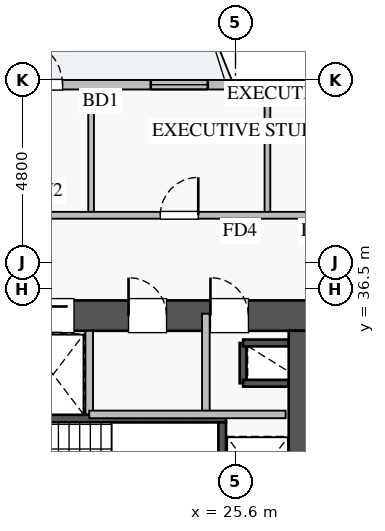
"""IFC4 building model, lengths in metres.
Left out: names, types, materials, properties, quantities, classifications, styles, units other than length and angle.
Written with IfcOpenShell. Run it as: python <this file> out.ifc"""

import sys

from ifc_helpers import new_model, si_unit, direction, frame, frame_2d, origin, place, context, subcontext, project, spatial, rectangle, extrude, source, transform, mapped, element, fill, save


model = new_model("IFC4")
c1 = context("Model", 3, precision=1e-05, world=origin(), true_north=direction((0.0, 1.0)))
c2 = subcontext(c1, "Body", "Model", "MODEL_VIEW")
j1 = project(units=[si_unit("LENGTHUNIT", "METRE"), si_unit("PLANEANGLEUNIT", "RADIAN")], contexts=[c1])
p1 = place(None, origin())
s1 = spatial("IfcSite", under=j1, at=p1, CompositionType="ELEMENT")
p2 = place(p1, origin())
s2 = spatial("IfcBuilding", under=s1, at=p2, CompositionType="ELEMENT")
p3 = place(p2, frame((0.0, 0.0, 76.25)))
s3 = spatial("IfcBuildingStorey", under=s2, at=p3, CompositionType="ELEMENT", Elevation=76.25)
p4 = place(p3, frame((25.8, 34.02, 0.0), z_axis=(0.0, 0.0, 1.0), x_axis=(0.0, 1.0, 0.0)))
e1 = element("IfcWall", 1, at=p4, inside=s3, PredefinedType="SHEAR", context=c2, shape_type="SweptSolid", body=[
    extrude(rectangle(XDim=1.06, YDim=0.18, at=frame_2d((0.53, 0.0))), origin(), (0.0, 0.0, 1.0), 3.07),
])
for number, where, z_axis, x_axis in (
    (2, (25.8, 35.08, 0.0), (0.0, 0.0, 1.0), (1.0, 0.0, 0.0)),
    (3, (25.8, 34.02, 0.0), (0.0, 0.0, 1.0), (1.0, 0.0, 0.0)),
):
    element("IfcWall", number, at=place(p3, frame(where, z_axis=z_axis, x_axis=x_axis)), inside=s3, PredefinedType="SHEAR", context=c2, shape_type="SweptSolid", body=[
        extrude(rectangle(XDim=1.2, YDim=0.18, at=frame_2d((0.6, 0.0))), origin(), (0.0, 0.0, 1.0), 3.07),
    ])
p5 = place(p3, frame((19.88, 33.2, 0.0), z_axis=(0.0, 0.0, 1.0), x_axis=(1.0, 0.0, 0.0)))
e4 = element("IfcWall", 4, at=p5, inside=s3, PredefinedType="SHEAR", context=c2, shape_type="SweptSolid", body=[
    extrude(rectangle(XDim=1.87, YDim=0.18, at=frame_2d((0.935, 0.0))), origin(), (0.0, 0.0, 1.0), 3.07),
])
p6 = place(p3, frame((18.2, 33.09, 0.0), z_axis=(0.0, 0.0, 1.0), x_axis=(1.0, 0.0, 0.0)))
e5 = element("IfcWall", 5, at=p6, inside=s3, PredefinedType="SHEAR", context=c2, shape_type="SweptSolid", body=[
    extrude(rectangle(XDim=7.15, YDim=0.2, at=frame_2d((3.575, 0.0))), origin(), (0.0, 0.0, 1.0), 3.25),
])
p7 = place(p6, frame((0.35, 0.0, 0.0)))
e6 = element("IfcOpeningElement", 6, at=p7, cuts=e5, PredefinedType="OPENING", context=c2, shape_type="SweptSolid", body=[
    extrude(rectangle(XDim=1.1, YDim=2.05, at=frame_2d((0.55, 1.025))), frame((0.0, 0.11, 0.0), z_axis=(0.0, -1.0, 0.0), x_axis=(1.0, 0.0, 0.0)), (0.0, 0.0, 1.0), 0.22),
])
p8 = place(p3, frame((25.25, 30.05, 0.0), z_axis=(0.0, 0.0, 1.0), x_axis=(0.0, 1.0, 0.0)))
e7 = element("IfcWall", 7, at=p8, inside=s3, PredefinedType="SHEAR", context=c2, shape_type="SweptSolid", body=[
    extrude(rectangle(XDim=2.94, YDim=0.2, at=frame_2d((1.47, 0.0))), origin(), (0.0, 0.0, 1.0), 3.25),
])
p9 = place(p3, frame((10.2, 35.8, 0.0), z_axis=(0.0, 0.0, 1.0), x_axis=(1.0, 0.0, 0.0)))
e8 = element("IfcWall", 8, at=p9, inside=s3, PredefinedType="SHEAR", context=c2, shape_type="SweptSolid", body=[
    extrude(rectangle(XDim=17.6, YDim=0.8, at=frame_2d((8.8, 0.0))), origin(), (0.0, 0.0, 1.0), 3.25),
])
p10 = place(p9, frame((1.15, 0.0, 0.0)))
e9 = element("IfcOpeningElement", 9, at=p10, cuts=e8, PredefinedType="OPENING", context=c2, shape_type="SweptSolid", body=[
    extrude(rectangle(XDim=1.1, YDim=2.05, at=frame_2d((0.55, 1.025))), frame((0.0, 0.41, 0.0), z_axis=(0.0, -1.0, 0.0), x_axis=(1.0, 0.0, 0.0)), (0.0, 0.0, 1.0), 0.82),
])
p11 = place(p9, frame((8.3, 0.0, 0.0)))
e10 = element("IfcOpeningElement", 10, at=p11, cuts=e8, PredefinedType="OPENING", context=c2, shape_type="SweptSolid", body=[
    extrude(rectangle(XDim=1.1, YDim=2.05, at=frame_2d((0.55, 1.025))), frame((0.0, 0.41, 0.0), z_axis=(0.0, -1.0, 0.0), x_axis=(1.0, 0.0, 0.0)), (0.0, 0.0, 1.0), 0.82),
])
p12 = place(p9, frame((10.05, 0.0, 0.0)))
e11 = element("IfcOpeningElement", 11, at=p12, cuts=e8, PredefinedType="OPENING", context=c2, shape_type="SweptSolid", body=[
    extrude(rectangle(XDim=1.1, YDim=2.05, at=frame_2d((0.55, 1.025))), frame((0.0, 0.41, 0.0), z_axis=(0.0, -1.0, 0.0), x_axis=(1.0, 0.0, 0.0)), (0.0, 0.0, 1.0), 0.82),
])
p13 = place(p9, frame((14.74, 0.0, 0.0)))
e12 = element("IfcOpeningElement", 12, at=p13, cuts=e8, PredefinedType="OPENING", context=c2, shape_type="SweptSolid", body=[
    extrude(rectangle(XDim=1.0, YDim=2.05, at=frame_2d((0.5, 1.025))), frame((0.0, 0.41, 0.0), z_axis=(0.0, -1.0, 0.0), x_axis=(1.0, 0.0, 0.0)), (0.0, 0.0, 1.0), 0.82),
])
p14 = place(p9, frame((12.585, 0.0, 0.0)))
e13 = element("IfcOpeningElement", 13, at=p14, cuts=e8, PredefinedType="OPENING", context=c2, shape_type="SweptSolid", body=[
    extrude(rectangle(XDim=1.0, YDim=2.05, at=frame_2d((0.5, 1.025))), frame((0.0, 0.41, 0.0), z_axis=(0.0, -1.0, 0.0), x_axis=(1.0, 0.0, 0.0)), (0.0, 0.0, 1.0), 0.82),
])
p15 = place(p3, frame((27.4, 29.8, 0.0), z_axis=(0.0, 0.0, 1.0), x_axis=(0.0, 1.0, 0.0)))
e14 = element("IfcWall", 14, at=p15, inside=s3, PredefinedType="SHEAR", context=c2, shape_type="SweptSolid", body=[
    extrude(rectangle(XDim=5.6, YDim=0.8, at=frame_2d((2.8, 0.0))), origin(), (0.0, 0.0, 1.0), 3.25),
])
p16 = place(p15, frame((1.1, 0.0, 0.0)))
e15 = element("IfcOpeningElement", 15, at=p16, cuts=e14, PredefinedType="OPENING", context=c2, shape_type="SweptSolid", body=[
    extrude(rectangle(XDim=1.3, YDim=2.05, at=frame_2d((0.65, 1.025))), frame((0.0, 0.41, 0.0), z_axis=(0.0, -1.0, 0.0), x_axis=(1.0, 0.0, 0.0)), (0.0, 0.0, 1.0), 0.82),
])
p17 = place(p3, frame((5.45, 41.875, 0.0), z_axis=(0.0, 0.0, 1.0), x_axis=(1.0, 0.0, 0.0)))
e16 = element("IfcWall", 16, at=p17, inside=s3, PredefinedType="STANDARD", context=c2, shape_type="SweptSolid", body=[
    extrude(rectangle(XDim=27.1, YDim=0.25, at=frame_2d((13.55, 0.0))), origin(), (0.0, 0.0, 1.0), 2.61),
])
p18 = place(p17, frame((14.4, 0.0, 0.0)))
e17 = element("IfcOpeningElement", 17, at=p18, cuts=e16, PredefinedType="OPENING", context=c2, shape_type="SweptSolid", body=[
    extrude(rectangle(XDim=1.2, YDim=2.1, at=frame_2d((0.6, 1.05))), frame((0.0, 0.135, 0.0), z_axis=(0.0, -1.0, 0.0), x_axis=(1.0, 0.0, 0.0)), (0.0, 0.0, 1.0), 0.27),
])
p19 = place(p17, frame((1.48, 0.0, 0.9)))
e18 = element("IfcOpeningElement", 18, at=p19, cuts=e16, PredefinedType="OPENING", context=c2, shape_type="SweptSolid", body=[
    extrude(rectangle(XDim=1.5, YDim=1.5, at=frame_2d((0.75, 0.75))), frame((0.0, 0.135, 0.0), z_axis=(0.0, -1.0, 0.0), x_axis=(1.0, 0.0, 0.0)), (0.0, 0.0, 1.0), 0.27),
])
p20 = place(p17, frame((7.725, 0.0, 0.9)))
e19 = element("IfcOpeningElement", 19, at=p20, cuts=e16, PredefinedType="OPENING", context=c2, shape_type="SweptSolid", body=[
    extrude(rectangle(XDim=1.8, YDim=1.5, at=frame_2d((0.9, 0.75))), frame((0.0, 0.135, 0.0), z_axis=(0.0, -1.0, 0.0), x_axis=(1.0, 0.0, 0.0)), (0.0, 0.0, 1.0), 0.27),
])
p21 = place(p17, frame((17.92, 0.0, 0.9)))
e20 = element("IfcOpeningElement", 20, at=p21, cuts=e16, PredefinedType="OPENING", context=c2, shape_type="SweptSolid", body=[
    extrude(rectangle(XDim=1.5, YDim=1.5, at=frame_2d((0.75, 0.75))), frame((0.0, 0.135, 0.0), z_axis=(0.0, -1.0, 0.0), x_axis=(1.0, 0.0, 0.0)), (0.0, 0.0, 1.0), 0.27),
])
p22 = place(p17, frame((22.663, 0.0, 0.9)))
e21 = element("IfcOpeningElement", 21, at=p22, cuts=e16, PredefinedType="OPENING", context=c2, shape_type="SweptSolid", body=[
    extrude(rectangle(XDim=2.1, YDim=1.48, at=frame_2d((1.05, 0.74))), frame((0.0, 0.135, 0.0), z_axis=(0.0, -1.0, 0.0), x_axis=(1.0, 0.0, 0.0)), (0.0, 0.0, 1.0), 0.27),
])
p23 = place(p17, frame((5.114, 0.0, 0.9)))
e22 = element("IfcOpeningElement", 22, at=p23, cuts=e16, PredefinedType="OPENING", context=c2, shape_type="SweptSolid", body=[
    extrude(rectangle(XDim=2.4, YDim=1.5, at=frame_2d((1.2, 0.75))), frame((0.0, 0.135, 0.0), z_axis=(0.0, -1.0, 0.0), x_axis=(1.0, 0.0, 0.0)), (0.0, 0.0, 1.0), 0.27),
])
p24 = place(p17, frame((10.893, 0.0, 0.9)))
e23 = element("IfcOpeningElement", 23, at=p24, cuts=e16, PredefinedType="OPENING", context=c2, shape_type="SweptSolid", body=[
    extrude(rectangle(XDim=2.4, YDim=1.5, at=frame_2d((1.2, 0.75))), frame((0.0, 0.135, 0.0), z_axis=(0.0, -1.0, 0.0), x_axis=(1.0, 0.0, 0.0)), (0.0, 0.0, 1.0), 0.27),
])
p25 = place(p3, frame((24.82, 33.2, 0.0), z_axis=(0.0, 0.0, 1.0), x_axis=(0.0, 1.0, 0.0)))
e24 = element("IfcWall", 24, at=p25, inside=s3, PredefinedType="PARTITIONING", context=c2, shape_type="SweptSolid", body=[
    extrude(rectangle(XDim=2.65, YDim=0.2, at=frame_2d((1.325, 0.0))), origin(), (0.0, 0.0, 1.0), 3.07),
])
p26 = place(p3, frame((21.75, 33.2, 0.0), z_axis=(0.0, 0.0, 1.0), x_axis=(0.0, 1.0, 0.0)))
e25 = element("IfcWall", 25, at=p26, inside=s3, PredefinedType="PARTITIONING", context=c2, shape_type="SweptSolid", body=[
    extrude(rectangle(XDim=2.2, YDim=0.2, at=frame_2d((1.1, 0.0))), origin(), (0.0, 0.0, 1.0), 3.07),
])
p27 = place(p3, frame((21.75, 33.2, 0.0), z_axis=(0.0, 0.0, 1.0), x_axis=(1.0, 0.0, 0.0)))
e26 = element("IfcWall", 26, at=p27, inside=s3, PredefinedType="PARTITIONING", context=c2, shape_type="SweptSolid", body=[
    extrude(rectangle(XDim=5.17, YDim=0.2, at=frame_2d((2.585, 0.0))), origin(), (0.0, 0.0, 1.0), 3.07),
])
for number, where, z_axis, x_axis in (
    (27, (21.8, 38.44, 0.0), (0.0, 0.0, 1.0), (0.0, 1.0, 0.0)),
    (28, (26.44, 38.44, 0.0), (0.0, 0.0, 1.0), (0.0, 1.0, 0.0)),
):
    element("IfcWall", number, at=place(p3, frame(where, z_axis=z_axis, x_axis=x_axis)), inside=s3, PredefinedType="PARTITIONING", context=c2, shape_type="SweptSolid", body=[
        extrude(rectangle(XDim=3.31, YDim=0.15, at=frame_2d((1.655, 0.0))), origin(), (0.0, 0.0, 1.0), 3.07),
    ])
p28 = place(p3, frame((8.78, 38.44, 0.0), z_axis=(0.0, 0.0, 1.0), x_axis=(1.0, 0.0, 0.0)))
e29 = element("IfcWall", 29, at=p28, inside=s3, PredefinedType="PARTITIONING", context=c2, shape_type="SweptSolid", body=[
    extrude(rectangle(XDim=23.54, YDim=0.18, at=frame_2d((11.77, 0.0))), origin(), (0.0, 0.0, 1.0), 3.07),
])
p29 = place(p28, frame((2.72, 0.0, 0.0)))
e30 = element("IfcOpeningElement", 30, at=p29, cuts=e29, PredefinedType="OPENING", context=c2, shape_type="SweptSolid", body=[
    extrude(rectangle(XDim=1.0, YDim=2.05, at=frame_2d((0.5, 1.025))), frame((0.0, 0.1, 0.0), z_axis=(0.0, -1.0, 0.0), x_axis=(1.0, 0.0, 0.0)), (0.0, 0.0, 1.0), 0.2),
])
p30 = place(p28, frame((9.23, 0.0, 0.0)))
e31 = element("IfcOpeningElement", 31, at=p30, cuts=e29, PredefinedType="OPENING", context=c2, shape_type="SweptSolid", body=[
    extrude(rectangle(XDim=1.0, YDim=2.05, at=frame_2d((0.5, 1.025))), frame((0.0, 0.1, 0.0), z_axis=(0.0, -1.0, 0.0), x_axis=(1.0, 0.0, 0.0)), (0.0, 0.0, 1.0), 0.2),
])
p31 = place(p28, frame((14.84, 0.0, 0.0)))
e32 = element("IfcOpeningElement", 32, at=p31, cuts=e29, PredefinedType="OPENING", context=c2, shape_type="SweptSolid", body=[
    extrude(rectangle(XDim=1.0, YDim=2.05, at=frame_2d((0.5, 1.025))), frame((0.0, 0.1, 0.0), z_axis=(0.0, -1.0, 0.0), x_axis=(1.0, 0.0, 0.0)), (0.0, 0.0, 1.0), 0.2),
])
p32 = place(p28, frame((20.1, 0.0, 0.0)))
e33 = element("IfcOpeningElement", 33, at=p32, cuts=e29, PredefinedType="OPENING", context=c2, shape_type="SweptSolid", body=[
    extrude(rectangle(XDim=1.0, YDim=2.05, at=frame_2d((0.5, 1.025))), frame((0.0, 0.1, 0.0), z_axis=(0.0, -1.0, 0.0), x_axis=(1.0, 0.0, 0.0)), (0.0, 0.0, 1.0), 0.2),
])
m1 = source(origin(), c2, "Body", "SweptSolid", [
    extrude(rectangle(XDim=1.2, YDim=2.1, at=frame_2d((0.6, 1.05))), frame((0.0, 0.025, 0.0), z_axis=(0.0, -1.0, 0.0), x_axis=(1.0, 0.0, 0.0)), (0.0, 0.0, 1.0), 0.05),
])
p33 = place(p18, origin())
e34 = element("IfcDoor", 34, at=p33, inside=s3, OperationType="SINGLE_SWING_LEFT", PredefinedType="DOOR", context=c2, shape_type="MappedRepresentation", body=[
    mapped(m1, transform((0.0, 0.0, 0.0), x_axis=(1.0, 0.0, 0.0), y_axis=(0.0, 1.0, 0.0), z_axis=(0.0, 0.0, 1.0), scale=1.0)),
])
fill(e17, e34)
m2 = source(origin(), c2, "Body", "SweptSolid", [
    extrude(rectangle(XDim=1.5, YDim=1.5, at=frame_2d((0.75, 0.75))), frame((0.0, 0.03, 0.0), z_axis=(0.0, -1.0, 0.0), x_axis=(1.0, 0.0, 0.0)), (0.0, 0.0, 1.0), 0.06),
])
p34 = place(p21, origin())
e35 = element("IfcWindow", 35, at=p34, inside=s3, PartitioningType="DOUBLE_PANEL_VERTICAL", PredefinedType="WINDOW", context=c2, shape_type="MappedRepresentation", body=[
    mapped(m2, transform((0.0, 0.0, 0.0), x_axis=(1.0, 0.0, 0.0), y_axis=(0.0, 1.0, 0.0), z_axis=(0.0, 0.0, 1.0), scale=1.0)),
])
fill(e20, e35)
m3 = source(origin(), c2, "Body", "SweptSolid", [
    extrude(rectangle(XDim=1.1, YDim=2.05, at=frame_2d((0.55, 1.025))), frame((0.0, 0.025, 0.0), z_axis=(0.0, -1.0, 0.0), x_axis=(1.0, 0.0, 0.0)), (0.0, 0.0, 1.0), 0.05),
])
p35 = place(p12, origin())
e36 = element("IfcDoor", 36, at=p35, inside=s3, OperationType="SLIDING_TO_LEFT", PredefinedType="DOOR", context=c2, shape_type="MappedRepresentation", body=[
    mapped(m3, transform((0.0, 0.0, 0.0), x_axis=(1.0, 0.0, 0.0), y_axis=(0.0, 1.0, 0.0), z_axis=(0.0, 0.0, 1.0), scale=1.0)),
])
fill(e11, e36)
m4 = source(origin(), c2, "Body", "SweptSolid", [
    extrude(rectangle(XDim=1.0, YDim=2.05, at=frame_2d((0.5, 1.025))), frame((0.0, 0.025, 0.0), z_axis=(0.0, -1.0, 0.0), x_axis=(1.0, 0.0, 0.0)), (0.0, 0.0, 1.0), 0.05),
])
p36 = place(p13, origin())
e37 = element("IfcDoor", 37, at=p36, inside=s3, OperationType="SINGLE_SWING_LEFT", PredefinedType="DOOR", context=c2, shape_type="MappedRepresentation", body=[
    mapped(m4, transform((0.0, 0.0, 0.0), x_axis=(1.0, 0.0, 0.0), y_axis=(0.0, 1.0, 0.0), z_axis=(0.0, 0.0, 1.0), scale=1.0)),
])
fill(e12, e37)
p37 = place(p14, origin())
e38 = element("IfcDoor", 38, at=p37, inside=s3, OperationType="SINGLE_SWING_LEFT", PredefinedType="DOOR", context=c2, shape_type="MappedRepresentation", body=[
    mapped(m4, transform((0.0, 0.0, 0.0), x_axis=(1.0, 0.0, 0.0), y_axis=(0.0, 1.0, 0.0), z_axis=(0.0, 0.0, 1.0), scale=1.0)),
])
fill(e13, e38)
p38 = place(p31, origin())
e39 = element("IfcDoor", 39, at=p38, inside=s3, OperationType="SINGLE_SWING_RIGHT", PredefinedType="DOOR", context=c2, shape_type="MappedRepresentation", body=[
    mapped(m4, transform((0.0, 0.0, 0.0), x_axis=(1.0, 0.0, 0.0), y_axis=(0.0, 1.0, 0.0), z_axis=(0.0, 0.0, 1.0), scale=1.0)),
])
fill(e32, e39)
save(model, sys.argv[1])
